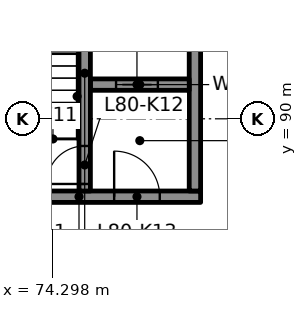
"""IFC4 building model, lengths in metres.
Left out: names, types, materials, properties, quantities, classifications, styles, units other than length and angle.
Written with IfcOpenShell. Run it as: python <this file> out.ifc"""

import sys

from ifc_helpers import new_model, si_unit, direction, frame, frame_2d, origin, place, context, subcontext, project, spatial, rectangle, extrude, element, fill, save


model = new_model("IFC4")
c1 = context("Model", 3, precision=1e-05, world=origin(), true_north=direction((0.0, 1.0)))
c2 = subcontext(c1, "Body", "Model", "MODEL_VIEW")
j1 = project(units=[si_unit("LENGTHUNIT", "METRE"), si_unit("PLANEANGLEUNIT", "RADIAN")], contexts=[c1])
p1 = place(None, origin())
s1 = spatial("IfcSite", under=j1, at=p1, CompositionType="ELEMENT")
p2 = place(p1, origin())
s2 = spatial("IfcBuilding", under=s1, at=p2, CompositionType="ELEMENT")
p3 = place(p2, frame((0.0, 0.0, 326.6)))
s3 = spatial("IfcBuildingStorey", under=s2, at=p3, CompositionType="ELEMENT", Elevation=326.6)
p4 = place(p3, frame((71.8, 87.95, 0.0), z_axis=(0.0, 0.0, 1.0), x_axis=(1.0, 0.0, 0.0)))
e1 = element("IfcWall", 1, at=p4, inside=s3, PredefinedType="SHEAR", context=c2, shape_type="SweptSolid", body=[
    extrude(rectangle(XDim=6.4, YDim=0.3, at=frame_2d((3.2, 0.0))), origin(), (0.0, 0.0, 1.0), 4.7),
])
p5 = place(p4, frame((1.325, 0.0, 0.0)))
e2 = element("IfcOpeningElement", 2, at=p5, cuts=e1, PredefinedType="OPENING", context=c2, shape_type="SweptSolid", body=[
    extrude(rectangle(XDim=1.0, YDim=2.1, at=frame_2d((0.5, 1.05))), frame((0.0, 0.16, 0.0), z_axis=(0.0, -1.0, 0.0), x_axis=(1.0, 0.0, 0.0)), (0.0, 0.0, 1.0), 0.32),
])
p6 = place(p4, frame((4.125, 0.0, 0.0)))
e3 = element("IfcOpeningElement", 3, at=p6, cuts=e1, PredefinedType="OPENING", context=c2, shape_type="SweptSolid", body=[
    extrude(rectangle(XDim=1.2, YDim=2.1, at=frame_2d((0.6, 1.05))), frame((0.0, 0.16, 0.0), z_axis=(0.0, -1.0, 0.0), x_axis=(1.0, 0.0, 0.0)), (0.0, 0.0, 1.0), 0.32),
])
p7 = place(p3, frame((78.05, 88.1, 0.0), z_axis=(0.0, 0.0, 1.0), x_axis=(0.0, 1.0, 0.0)))
e4 = element("IfcWall", 4, at=p7, inside=s3, PredefinedType="SHEAR", context=c2, shape_type="SweptSolid", body=[
    extrude(rectangle(XDim=6.2, YDim=0.3, at=frame_2d((3.1, 0.0))), origin(), (0.0, 0.0, 1.0), 4.7),
])
p8 = place(p3, frame((75.3, 90.9, 0.0), z_axis=(0.0, 0.0, 1.0), x_axis=(1.0, 0.0, 0.0)))
e5 = element("IfcWall", 5, at=p8, inside=s3, PredefinedType="SHEAR", context=c2, shape_type="SweptSolid", body=[
    extrude(rectangle(XDim=2.6, YDim=0.3, at=frame_2d((1.3, 0.0))), origin(), (0.0, 0.0, 1.0), 4.7),
])
p9 = place(p8, frame((0.675, 0.0, 0.0)))
e6 = element("IfcOpeningElement", 6, at=p9, cuts=e5, PredefinedType="OPENING", context=c2, shape_type="SweptSolid", body=[
    extrude(rectangle(XDim=1.1, YDim=2.1, at=frame_2d((0.55, 1.05))), frame((0.0, 0.16, 0.0), z_axis=(0.0, -1.0, 0.0), x_axis=(1.0, 0.0, 0.0)), (0.0, 0.0, 1.0), 0.32),
])
p10 = place(p3, frame((75.15, 88.1, 0.0), z_axis=(0.0, 0.0, 1.0), x_axis=(0.0, 1.0, 0.0)))
e7 = element("IfcWall", 7, at=p10, inside=s3, PredefinedType="SHEAR", context=c2, shape_type="SweptSolid", body=[
    extrude(rectangle(XDim=6.2, YDim=0.3, at=frame_2d((3.1, 0.0))), origin(), (0.0, 0.0, 1.0), 4.7),
])
p11 = place(p10, frame((0.185, 0.0, 0.0)))
e8 = element("IfcOpeningElement", 8, at=p11, cuts=e7, PredefinedType="OPENING", context=c2, shape_type="SweptSolid", body=[
    extrude(rectangle(XDim=1.0, YDim=2.1, at=frame_2d((0.5, 1.05))), frame((0.0, 0.16, 0.0), z_axis=(0.0, -1.0, 0.0), x_axis=(1.0, 0.0, 0.0)), (0.0, 0.0, 1.0), 0.32),
])
p12 = place(p9, origin())
e9 = element("IfcDoor", 9, at=p12, inside=s3, OperationType="DOUBLE_DOOR_SLIDING", PredefinedType="DOOR", context=c2, shape_type="SweptSolid", body=[
    extrude(rectangle(XDim=1.1, YDim=2.1, at=frame_2d((0.55, 1.05))), frame((0.0, 0.025, 0.0), z_axis=(0.0, -1.0, 0.0), x_axis=(1.0, 0.0, 0.0)), (0.0, 0.0, 1.0), 0.05),
])
fill(e6, e9)
p13 = place(p11, origin())
e10 = element("IfcDoor", 10, at=p13, inside=s3, OperationType="SINGLE_SWING_LEFT", PredefinedType="DOOR", context=c2, shape_type="SweptSolid", body=[
    extrude(rectangle(XDim=1.0, YDim=2.1, at=frame_2d((0.5, 1.05))), frame((0.0, 0.025, 0.0), z_axis=(0.0, -1.0, 0.0), x_axis=(1.0, 0.0, 0.0)), (0.0, 0.0, 1.0), 0.05),
])
fill(e8, e10)
p14 = place(p6, origin())
e11 = element("IfcDoor", 11, at=p14, inside=s3, OperationType="SINGLE_SWING_RIGHT", PredefinedType="DOOR", context=c2, shape_type="SweptSolid", body=[
    extrude(rectangle(XDim=1.2, YDim=2.1, at=frame_2d((0.6, 1.05))), frame((0.0, 0.025, 0.0), z_axis=(0.0, -1.0, 0.0), x_axis=(1.0, 0.0, 0.0)), (0.0, 0.0, 1.0), 0.05),
])
fill(e3, e11)
save(model, sys.argv[1])
